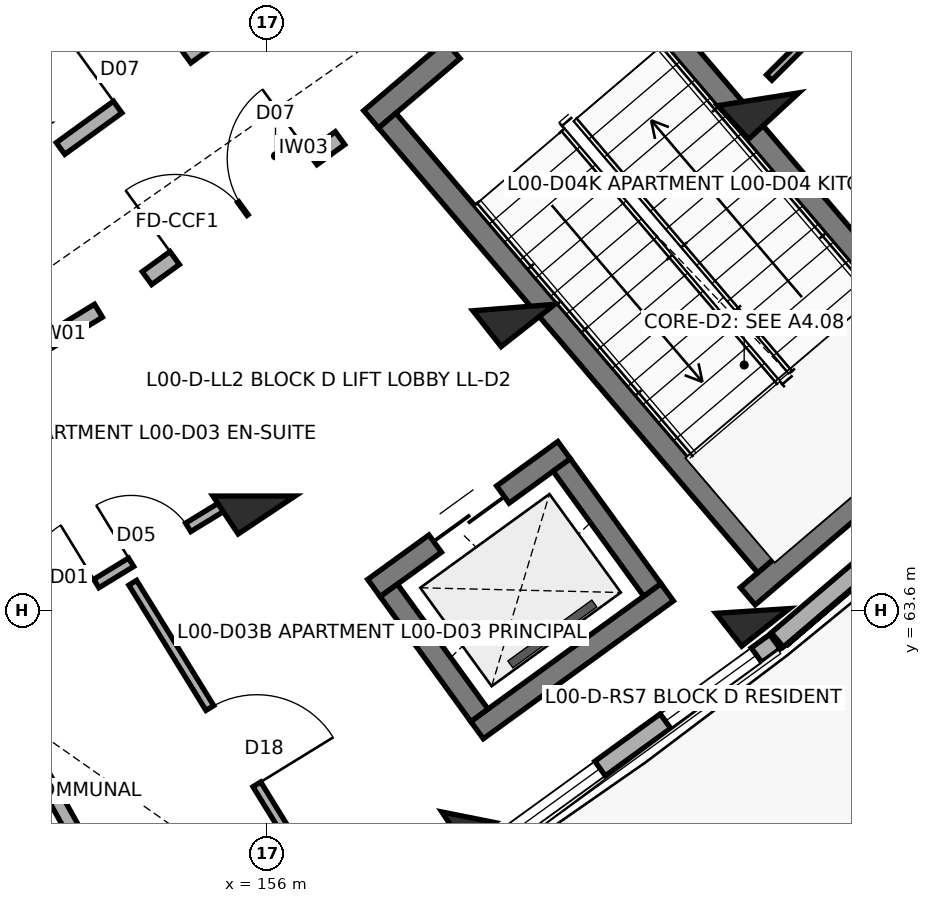
"""IFC4 building model, lengths in metres.
Left out: names, types, materials, properties, quantities, classifications, styles, units other than length and angle.
Written with IfcOpenShell. Run it as: python <this file> out.ifc"""

import sys

from ifc_helpers import new_model, si_unit, direction, frame, frame_2d, origin, origin_2d, place, context, subcontext, project, spatial, rectangle, extrude, element, fill, save


model = new_model("IFC4")
c1 = context("Model", 3, precision=1e-05, world=origin(), true_north=direction((0.0, 1.0)))
c2 = subcontext(c1, "Body", "Model", "MODEL_VIEW")
j1 = project(units=[si_unit("LENGTHUNIT", "METRE"), si_unit("PLANEANGLEUNIT", "RADIAN")], contexts=[c1])
p1 = place(None, origin())
s1 = spatial("IfcSite", under=j1, at=p1, CompositionType="ELEMENT")
p2 = place(p1, origin())
s2 = spatial("IfcBuilding", under=s1, at=p2, CompositionType="ELEMENT")
p3 = place(p2, origin())
s3 = spatial("IfcBuildingStorey", under=s2, at=p3, CompositionType="ELEMENT", Elevation=0.0)
p4 = place(p3, frame((155.831, 65.101, 0.0), z_axis=(0.0, 0.0, 1.0), x_axis=(0.554844427448, -0.83195412213, 0.0)))
e1 = element("IfcColumn", 1, at=p4, inside=s3, PredefinedType="COLUMN", context=c2, shape_type="SweptSolid", body=[
    extrude(rectangle(XDim=0.6, YDim=0.9, at=origin_2d()), origin(), (0.0, 0.0, 1.0), 4.5),
])
p5 = place(p3, frame((158.649, 60.875, 0.0), z_axis=(0.0, 0.0, 1.0), x_axis=(0.554844427448, -0.83195412213, 0.0)))
e2 = element("IfcColumn", 2, at=p5, inside=s3, PredefinedType="COLUMN", context=c2, shape_type="SweptSolid", body=[
    extrude(rectangle(XDim=0.5, YDim=0.5, at=origin_2d()), origin(), (0.0, 0.0, 1.0), 4.5),
])
p6 = place(p3, frame((159.25, 67.581, 0.0), z_axis=(0.0, 0.0, 1.0), x_axis=(0.618408395358, -0.785856893175, 0.0)))
e3 = element("IfcColumn", 3, at=p6, inside=s3, PredefinedType="COLUMN", context=c2, shape_type="SweptSolid", body=[
    extrude(rectangle(XDim=0.6, YDim=0.9, at=origin_2d()), origin(), (0.0, 0.0, 1.0), 4.5),
])
p7 = place(p3, frame((162.392, 63.589, 0.0), z_axis=(0.0, 0.0, 1.0), x_axis=(0.618408395358, -0.785856893175, 0.0)))
e4 = element("IfcColumn", 4, at=p7, inside=s3, PredefinedType="COLUMN", context=c2, shape_type="SweptSolid", body=[
    extrude(rectangle(XDim=0.55, YDim=0.8, at=origin_2d()), origin(), (0.0, 0.0, 1.0), 4.5),
])
p8 = place(p3, frame((162.465, 70.322, 0.0), z_axis=(0.0, 0.0, 1.0), x_axis=(0.678159669868, -0.73491459515, 0.0)))
e5 = element("IfcColumn", 5, at=p8, inside=s3, PredefinedType="COLUMN", context=c2, shape_type="SweptSolid", body=[
    extrude(rectangle(XDim=0.6, YDim=0.9, at=origin_2d()), origin(), (0.0, 0.0, 1.0), 4.5),
])
p9 = place(p3, frame((158.943, 60.47, 0.0), z_axis=(0.0, 0.0, 1.0), x_axis=(0.809511918444, 0.58710344395, 0.0)))
e6 = element("IfcWall", 6, at=p9, inside=s3, PredefinedType="SOLIDWALL", context=c2, shape_type="SweptSolid", body=[
    extrude(rectangle(XDim=4.623, YDim=0.235, at=frame_2d((2.311, 0.0))), origin(), (0.0, 0.0, 1.0), 3.45),
])
p10 = place(p9, frame((0.3, 0.0, 0.3)))
e7 = element("IfcOpeningElement", 7, at=p10, cuts=e6, PredefinedType="OPENING", context=c2, shape_type="SweptSolid", body=[
    extrude(rectangle(XDim=1.48, YDim=1.42, at=frame_2d((0.74, 0.71))), frame((0.0, 0.127, 0.0), z_axis=(0.0, -1.0, 0.0), x_axis=(1.0, 0.0, 0.0)), (0.0, 0.0, 1.0), 0.255),
])
p11 = place(p9, frame((2.843, 0.0, 0.3)))
e8 = element("IfcOpeningElement", 8, at=p11, cuts=e6, PredefinedType="OPENING", context=c2, shape_type="SweptSolid", body=[
    extrude(rectangle(XDim=1.48, YDim=1.42, at=frame_2d((0.74, 0.71))), frame((0.0, 0.127, 0.0), z_axis=(0.0, -1.0, 0.0), x_axis=(1.0, 0.0, 0.0)), (0.0, 0.0, 1.0), 0.255),
])
p12 = place(p3, frame((162.716, 63.209, 0.0), z_axis=(0.0, 0.0, 1.0), x_axis=(0.760968923704, 0.64878833001, 0.0)))
e9 = element("IfcWall", 9, at=p12, inside=s3, PredefinedType="SOLIDWALL", context=c2, shape_type="SweptSolid", body=[
    extrude(rectangle(XDim=4.623, YDim=0.245, at=frame_2d((2.311, 0.0))), origin(), (0.0, 0.0, 1.0), 3.45),
])
p13 = place(p3, frame((157.372, 70.058, 0.0), z_axis=(0.0, 0.0, 1.0), x_axis=(0.760990583254, 0.648762924495, 0.0)))
e10 = element("IfcWall", 10, at=p13, inside=s3, PredefinedType="SHEAR", context=c2, shape_type="SweptSolid", body=[
    extrude(rectangle(XDim=3.87, YDim=0.3, at=frame_2d((1.935, 0.0))), origin(), (0.0, 0.0, 1.0), 4.5),
])
p14 = place(p13, frame((1.41, 0.0, 0.0)))
e11 = element("IfcOpeningElement", 11, at=p14, cuts=e10, PredefinedType="OPENING", context=c2, shape_type="SweptSolid", body=[
    extrude(rectangle(XDim=1.05, YDim=2.15, at=frame_2d((0.525, 1.075))), frame((0.0, 0.16, 0.0), z_axis=(0.0, -1.0, 0.0), x_axis=(1.0, 0.0, 0.0)), (0.0, 0.0, 1.0), 0.32),
])
p15 = place(p3, frame((162.327, 63.783, 0.0), z_axis=(0.0, 0.0, 1.0), x_axis=(0.760969560012, 0.648787583678, 0.0)))
e12 = element("IfcWall", 12, at=p15, inside=s3, PredefinedType="SHEAR", context=c2, shape_type="SweptSolid", body=[
    extrude(rectangle(XDim=4.47, YDim=0.3, at=frame_2d((2.235, 0.0))), origin(), (0.0, 0.0, 1.0), 4.5),
])
p16 = place(p3, frame((157.583, 70.041, 0.0), z_axis=(0.0, 0.0, 1.0), x_axis=(0.648762810187, -0.760990680704, 0.0)))
e13 = element("IfcWall", 13, at=p16, inside=s3, PredefinedType="SHEAR", context=c2, shape_type="SweptSolid", body=[
    extrude(rectangle(XDim=7.69, YDim=0.3, at=frame_2d((3.845, 0.0))), origin(), (0.0, 0.0, 1.0), 4.5),
])
p17 = place(p3, frame((160.3, 72.357, 0.0), z_axis=(0.0, 0.0, 1.0), x_axis=(0.648781194888, -0.760975006922, 0.0)))
e14 = element("IfcWall", 14, at=p17, inside=s3, PredefinedType="SHEAR", context=c2, shape_type="SweptSolid", body=[
    extrude(rectangle(XDim=7.69, YDim=0.3, at=frame_2d((3.845, 0.0))), origin(), (0.0, 0.0, 1.0), 4.5),
])
p18 = place(p3, frame((157.409, 63.89, 0.0), z_axis=(0.0, 0.0, 1.0), x_axis=(0.809510936031, 0.587104798521, 0.0)))
e15 = element("IfcWall", 15, at=p18, inside=s3, PredefinedType="SHEAR", context=c2, shape_type="SweptSolid", body=[
    extrude(rectangle(XDim=3.09, YDim=0.28, at=frame_2d((1.545, 0.0))), origin(), (0.0, 0.0, 1.0), 4.5),
])
p19 = place(p18, frame((0.995, 0.0, 0.0)))
e16 = element("IfcOpeningElement", 16, at=p19, cuts=e15, PredefinedType="OPENING", context=c2, shape_type="SweptSolid", body=[
    extrude(rectangle(XDim=1.1, YDim=2.15, at=frame_2d((0.55, 1.075))), frame((0.0, 0.15, 0.0), z_axis=(0.0, -1.0, 0.0), x_axis=(1.0, 0.0, 0.0)), (0.0, 0.0, 1.0), 0.3),
])
p20 = place(p3, frame((158.765, 62.021, 0.0), z_axis=(0.0, 0.0, 1.0), x_axis=(0.809548485838, 0.587053020669, 0.0)))
e17 = element("IfcWall", 17, at=p20, inside=s3, PredefinedType="SHEAR", context=c2, shape_type="SweptSolid", body=[
    extrude(rectangle(XDim=3.09, YDim=0.28, at=frame_2d((1.545, 0.0))), origin(), (0.0, 0.0, 1.0), 4.5),
])
p21 = place(p3, frame((157.604, 63.859, 0.0), z_axis=(0.0, 0.0, 1.0), x_axis=(0.587127188998, -0.809494696671, 0.0)))
e18 = element("IfcWall", 18, at=p21, inside=s3, PredefinedType="SHEAR", context=c2, shape_type="SweptSolid", body=[
    extrude(rectangle(XDim=2.03, YDim=0.28, at=frame_2d((1.015, 0.0))), origin(), (0.0, 0.0, 1.0), 4.5),
])
p22 = place(p3, frame((159.879, 65.509, 0.0), z_axis=(0.0, 0.0, 1.0), x_axis=(0.58704837408, -0.809551855344, 0.0)))
e19 = element("IfcWall", 19, at=p22, inside=s3, PredefinedType="SHEAR", context=c2, shape_type="SweptSolid", body=[
    extrude(rectangle(XDim=2.03, YDim=0.28, at=frame_2d((1.015, 0.0))), origin(), (0.0, 0.0, 1.0), 4.5),
])
p23 = place(p3, frame((150.989, 65.829, 0.0), z_axis=(0.0, 0.0, 1.0), x_axis=(0.853090237845, 0.521763400492, 0.0)))
e20 = element("IfcWall", 20, at=p23, inside=s3, PredefinedType="SOLIDWALL", context=c2, shape_type="SweptSolid", body=[
    extrude(rectangle(XDim=3.277, YDim=0.2, at=frame_2d((1.638, 0.0))), origin(), (0.0, 0.0, 1.0), 3.34),
])
p24 = place(p23, frame((1.148, 0.0, 0.0)))
e21 = element("IfcOpeningElement", 21, at=p24, cuts=e20, PredefinedType="OPENING", context=c2, shape_type="SweptSolid", body=[
    extrude(rectangle(XDim=0.98, YDim=2.15, at=frame_2d((0.49, 1.075))), frame((0.0, 0.11, 0.0), z_axis=(0.0, -1.0, 0.0), x_axis=(1.0, 0.0, 0.0)), (0.0, 0.0, 1.0), 0.22),
])
p25 = place(p3, frame((152.434, 63.141, 0.0), z_axis=(0.0, 0.0, 1.0), x_axis=(0.853089873067, 0.521763996909, 0.0)))
e22 = element("IfcWall", 22, at=p25, inside=s3, PredefinedType="PARTITIONING", context=c2, shape_type="SweptSolid", body=[
    extrude(rectangle(XDim=3.616, YDim=0.13, at=frame_2d((1.808, 0.0))), origin(), (0.0, 0.0, 1.0), 3.34),
])
p26 = place(p25, frame((0.65, 0.0, 0.0)))
e23 = element("IfcOpeningElement", 23, at=p26, cuts=e22, PredefinedType="OPENING", context=c2, shape_type="SweptSolid", body=[
    extrude(rectangle(XDim=0.9, YDim=2.1, at=frame_2d((0.45, 1.05))), frame((0.0, 0.075, 0.0), z_axis=(0.0, -1.0, 0.0), x_axis=(1.0, 0.0, 0.0)), (0.0, 0.0, 1.0), 0.15),
])
p27 = place(p25, frame((2.086, 0.0, 0.0)))
e24 = element("IfcOpeningElement", 24, at=p27, cuts=e22, PredefinedType="OPENING", context=c2, shape_type="SweptSolid", body=[
    extrude(rectangle(XDim=0.88, YDim=2.1, at=frame_2d((0.44, 1.05))), frame((0.0, 0.075, 0.0), z_axis=(0.0, -1.0, 0.0), x_axis=(1.0, 0.0, 0.0)), (0.0, 0.0, 1.0), 0.15),
])
p28 = place(p3, frame((154.235, 63.96, 0.0), z_axis=(0.0, 0.0, 1.0), x_axis=(0.524202618281, -0.851593573829, 0.0)))
e25 = element("IfcWall", 25, at=p28, inside=s3, PredefinedType="PARTITIONING", context=c2, shape_type="SweptSolid", body=[
    extrude(rectangle(XDim=5.05, YDim=0.12, at=frame_2d((2.525, 0.0))), origin(), (0.0, 0.0, 1.0), 3.34),
])
p29 = place(p28, frame((1.935, 0.0, 0.0)))
e26 = element("IfcOpeningElement", 26, at=p29, cuts=e25, PredefinedType="OPENING", context=c2, shape_type="SweptSolid", body=[
    extrude(rectangle(XDim=1.18, YDim=2.1, at=frame_2d((0.59, 1.05))), frame((0.0, 0.07, 0.0), z_axis=(0.0, -1.0, 0.0), x_axis=(1.0, 0.0, 0.0)), (0.0, 0.0, 1.0), 0.14),
])
p30 = place(p3, frame((152.471, 62.46, 0.0), z_axis=(0.0, 0.0, 1.0), x_axis=(0.487866639184, -0.872918176218, 0.0)))
e27 = element("IfcWall", 27, at=p30, inside=s3, PredefinedType="SOLIDWALL", context=c2, shape_type="SweptSolid", body=[
    extrude(rectangle(XDim=4.35, YDim=0.185, at=frame_2d((2.175, 0.0))), origin(), (0.0, 0.0, 1.0), 3.34),
])
p31 = place(p3, frame((154.423, 67.968, 0.0), z_axis=(0.0, 0.0, 1.0), x_axis=(0.809516127005, 0.587097641043, 0.0)))
e28 = element("IfcWall", 28, at=p31, inside=s3, PredefinedType="SOLIDWALL", context=c2, shape_type="SweptSolid", body=[
    extrude(rectangle(XDim=3.137, YDim=0.21, at=frame_2d((1.569, 0.0))), origin(), (0.0, 0.0, 1.0), 3.34),
])
p32 = place(p31, frame((0.45, 0.0, 0.0)))
e29 = element("IfcOpeningElement", 29, at=p32, cuts=e28, PredefinedType="OPENING", context=c2, shape_type="SweptSolid", body=[
    extrude(rectangle(XDim=1.1, YDim=2.15, at=frame_2d((0.55, 1.075))), frame((0.0, 0.115, 0.0), z_axis=(0.0, -1.0, 0.0), x_axis=(1.0, 0.0, 0.0)), (0.0, 0.0, 1.0), 0.23),
])
p33 = place(p31, frame((1.567, 0.0, 0.0)))
e30 = element("IfcOpeningElement", 30, at=p33, cuts=e28, PredefinedType="OPENING", context=c2, shape_type="SweptSolid", body=[
    extrude(rectangle(XDim=1.12, YDim=2.15, at=frame_2d((0.56, 1.075))), frame((0.0, 0.115, 0.0), z_axis=(0.0, -1.0, 0.0), x_axis=(1.0, 0.0, 0.0)), (0.0, 0.0, 1.0), 0.23),
])
p34 = place(p3, frame((153.285, 69.674, 0.0), z_axis=(0.0, 0.0, 1.0), x_axis=(0.809505174959, 0.587112741911, 0.0)))
e31 = element("IfcWall", 31, at=p34, inside=s3, PredefinedType="SOLIDWALL", context=c2, shape_type="SweptSolid", body=[
    extrude(rectangle(XDim=2.976, YDim=0.19, at=frame_2d((1.488, 0.0))), origin(), (0.0, 0.0, 1.0), 3.34),
])
p35 = place(p34, frame((0.928, 0.0, 0.0)))
e32 = element("IfcOpeningElement", 32, at=p35, cuts=e31, PredefinedType="OPENING", context=c2, shape_type="SweptSolid", body=[
    extrude(rectangle(XDim=1.12, YDim=2.15, at=frame_2d((0.56, 1.075))), frame((0.0, 0.105, 0.0), z_axis=(0.0, -1.0, 0.0), x_axis=(1.0, 0.0, 0.0)), (0.0, 0.0, 1.0), 0.21),
])
p36 = place(p3, frame((162.609, 70.607, 0.0), z_axis=(0.0, 0.0, 1.0), x_axis=(0.707714058013, 0.70649898237, 0.0)))
e33 = element("IfcWall", 33, at=p36, inside=s3, PredefinedType="PARTITIONING", context=c2, shape_type="SweptSolid", body=[
    extrude(rectangle(XDim=3.617, YDim=0.1, at=frame_2d((1.808, 0.0))), origin(), (0.0, 0.0, 1.0), 3.34),
])
p37 = place(p36, frame((0.65, 0.0, 0.0)))
e34 = element("IfcOpeningElement", 34, at=p37, cuts=e33, PredefinedType="OPENING", context=c2, shape_type="SweptSolid", body=[
    extrude(rectangle(XDim=0.9, YDim=2.1, at=frame_2d((0.45, 1.05))), frame((0.0, 0.06, 0.0), z_axis=(0.0, -1.0, 0.0), x_axis=(1.0, 0.0, 0.0)), (0.0, 0.0, 1.0), 0.12),
])
p38 = place(p36, frame((2.086, 0.0, 0.0)))
e35 = element("IfcOpeningElement", 35, at=p38, cuts=e33, PredefinedType="OPENING", context=c2, shape_type="SweptSolid", body=[
    extrude(rectangle(XDim=0.88, YDim=2.1, at=frame_2d((0.44, 1.05))), frame((0.0, 0.06, 0.0), z_axis=(0.0, -1.0, 0.0), x_axis=(1.0, 0.0, 0.0)), (0.0, 0.0, 1.0), 0.12),
])
p39 = place(p10, origin())
e36 = element("IfcWindow", 36, at=p39, inside=s3, PartitioningType="DOUBLE_PANEL_VERTICAL", PredefinedType="WINDOW", context=c2, shape_type="SweptSolid", body=[
    extrude(rectangle(XDim=1.48, YDim=1.42, at=frame_2d((0.74, 0.71))), frame((0.0, 0.03, 0.0), z_axis=(0.0, -1.0, 0.0), x_axis=(1.0, 0.0, 0.0)), (0.0, 0.0, 1.0), 0.06),
])
fill(e7, e36)
p40 = place(p11, origin())
e37 = element("IfcWindow", 37, at=p40, inside=s3, PartitioningType="DOUBLE_PANEL_VERTICAL", PredefinedType="WINDOW", context=c2, shape_type="SweptSolid", body=[
    extrude(rectangle(XDim=1.48, YDim=1.42, at=frame_2d((0.74, 0.71))), frame((0.0, 0.03, 0.0), z_axis=(0.0, -1.0, 0.0), x_axis=(1.0, 0.0, 0.0)), (0.0, 0.0, 1.0), 0.06),
])
fill(e8, e37)
p41 = place(p19, origin())
e38 = element("IfcDoor", 38, at=p41, inside=s3, OperationType="DOUBLE_DOOR_SLIDING", PredefinedType="DOOR", context=c2, shape_type="SweptSolid", body=[
    extrude(rectangle(XDim=1.1, YDim=2.15, at=frame_2d((0.55, 1.075))), frame((0.0, 0.025, 0.0), z_axis=(0.0, -1.0, 0.0), x_axis=(1.0, 0.0, 0.0)), (0.0, 0.0, 1.0), 0.05),
])
fill(e16, e38)
p42 = place(p26, origin())
e39 = element("IfcDoor", 39, at=p42, inside=s3, OperationType="SINGLE_SWING_RIGHT", PredefinedType="DOOR", context=c2, shape_type="SweptSolid", body=[
    extrude(rectangle(XDim=0.9, YDim=2.1, at=frame_2d((0.45, 1.05))), frame((0.0, 0.025, 0.0), z_axis=(0.0, -1.0, 0.0), x_axis=(1.0, 0.0, 0.0)), (0.0, 0.0, 1.0), 0.05),
])
fill(e23, e39)
p43 = place(p27, origin())
e40 = element("IfcDoor", 40, at=p43, inside=s3, OperationType="SINGLE_SWING_LEFT", PredefinedType="DOOR", context=c2, shape_type="SweptSolid", body=[
    extrude(rectangle(XDim=0.88, YDim=2.1, at=frame_2d((0.44, 1.05))), frame((0.0, 0.025, 0.0), z_axis=(0.0, -1.0, 0.0), x_axis=(1.0, 0.0, 0.0)), (0.0, 0.0, 1.0), 0.05),
])
fill(e24, e40)
p44 = place(p29, origin())
e41 = element("IfcDoor", 41, at=p44, inside=s3, OperationType="SINGLE_SWING_RIGHT", PredefinedType="DOOR", context=c2, shape_type="SweptSolid", body=[
    extrude(rectangle(XDim=1.18, YDim=2.1, at=frame_2d((0.59, 1.05))), frame((0.0, 0.025, 0.0), z_axis=(0.0, -1.0, 0.0), x_axis=(1.0, 0.0, 0.0)), (0.0, 0.0, 1.0), 0.05),
])
fill(e26, e41)
p45 = place(p32, origin())
e42 = element("IfcDoor", 42, at=p45, inside=s3, OperationType="SINGLE_SWING_LEFT", PredefinedType="DOOR", context=c2, shape_type="SweptSolid", body=[
    extrude(rectangle(XDim=1.1, YDim=2.15, at=frame_2d((0.55, 1.075))), frame((0.0, 0.025, 0.0), z_axis=(0.0, -1.0, 0.0), x_axis=(1.0, 0.0, 0.0)), (0.0, 0.0, 1.0), 0.05),
])
fill(e29, e42)
p46 = place(p33, origin())
e43 = element("IfcDoor", 43, at=p46, inside=s3, OperationType="SINGLE_SWING_RIGHT", PredefinedType="DOOR", context=c2, shape_type="SweptSolid", body=[
    extrude(rectangle(XDim=1.12, YDim=2.15, at=frame_2d((0.56, 1.075))), frame((0.0, 0.025, 0.0), z_axis=(0.0, -1.0, 0.0), x_axis=(1.0, 0.0, 0.0)), (0.0, 0.0, 1.0), 0.05),
])
fill(e30, e43)
p47 = place(p35, origin())
e44 = element("IfcDoor", 44, at=p47, inside=s3, OperationType="SINGLE_SWING_LEFT", PredefinedType="DOOR", context=c2, shape_type="SweptSolid", body=[
    extrude(rectangle(XDim=1.12, YDim=2.15, at=frame_2d((0.56, 1.075))), frame((0.0, 0.025, 0.0), z_axis=(0.0, -1.0, 0.0), x_axis=(1.0, 0.0, 0.0)), (0.0, 0.0, 1.0), 0.05),
])
fill(e32, e44)
save(model, sys.argv[1])
